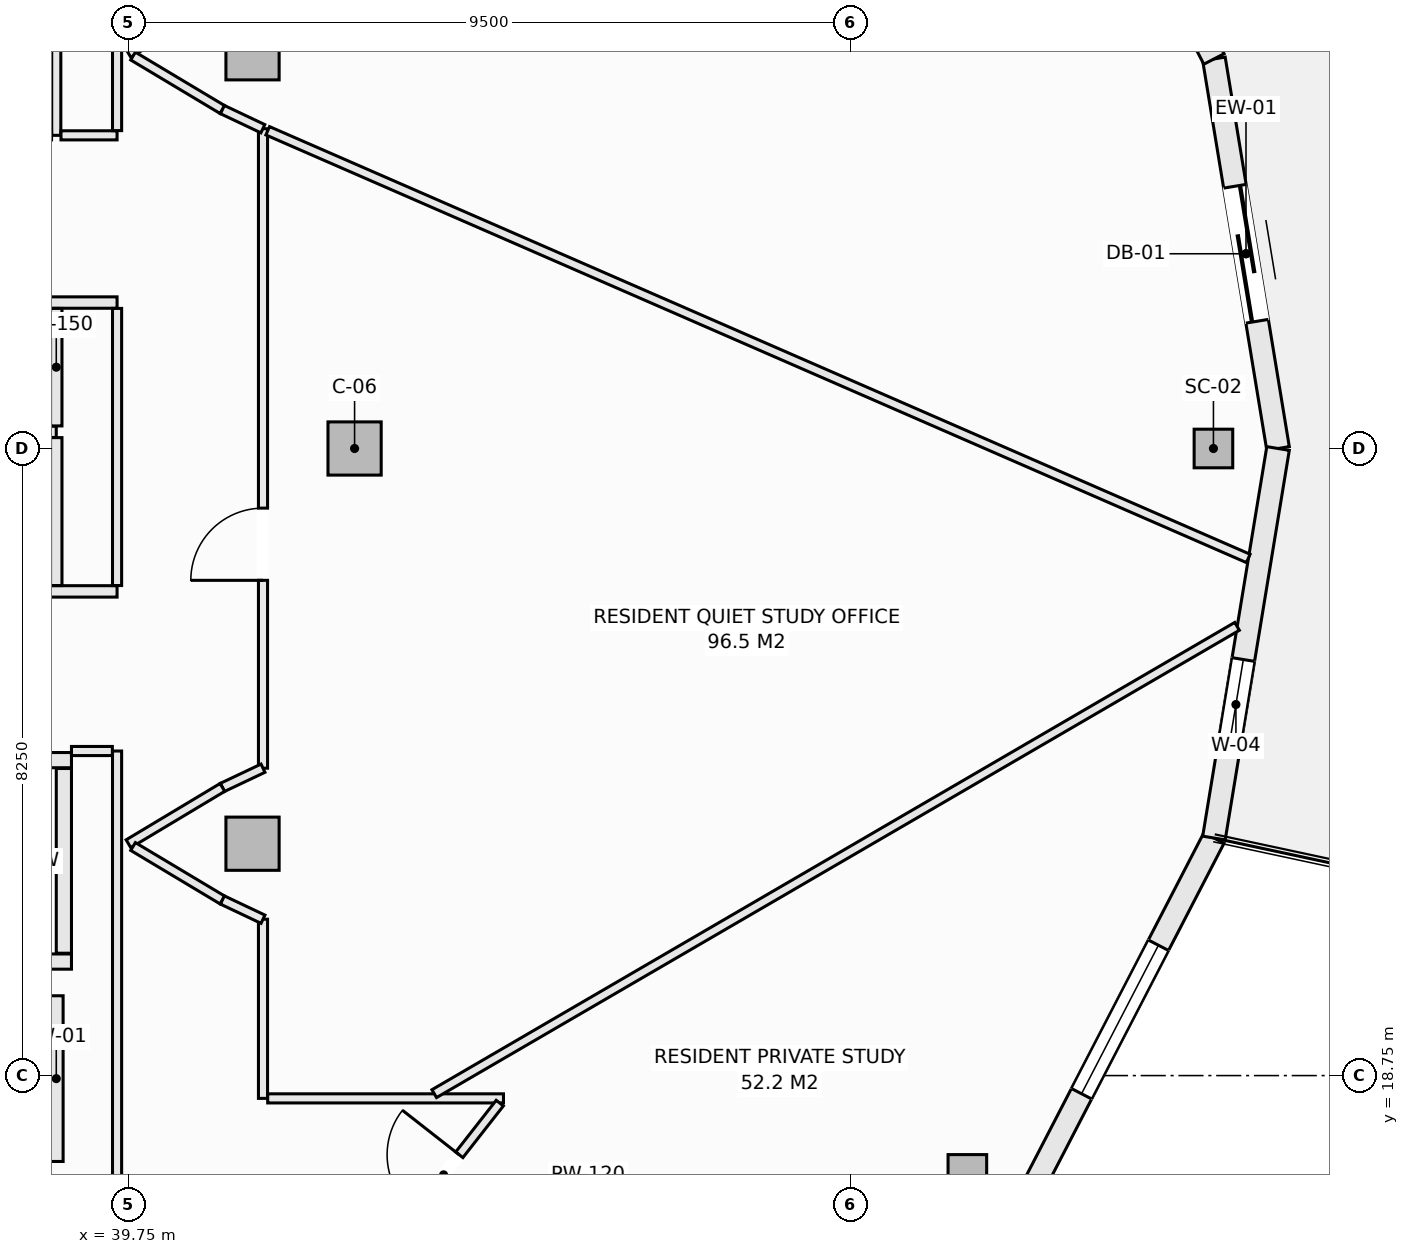
"""IFC4 building model, lengths in metres.
Left out: names, types, materials, properties, quantities, classifications, styles, units other than length and angle.
Written with IfcOpenShell. Run it as: python <this file> out.ifc"""

import sys

from ifc_helpers import new_model, si_unit, direction, frame, frame_2d, origin, origin_2d, place, context, subcontext, project, spatial, rectangle, hollow_rectangle, extrude, element, fill, save


model = new_model("IFC4")
c1 = context("Model", 3, precision=1e-05, world=origin(), true_north=direction((0.0, 1.0)))
c2 = subcontext(c1, "Body", "Model", "MODEL_VIEW")
j1 = project(units=[si_unit("LENGTHUNIT", "METRE"), si_unit("PLANEANGLEUNIT", "RADIAN")], contexts=[c1])
p1 = place(None, origin())
s1 = spatial("IfcSite", under=j1, at=p1, CompositionType="ELEMENT")
p2 = place(p1, origin())
s2 = spatial("IfcBuilding", under=s1, at=p2, CompositionType="ELEMENT")
p3 = place(p2, frame((0.0, 0.0, 232.7)))
s3 = spatial("IfcBuildingStorey", under=s2, at=p3, CompositionType="ELEMENT", Elevation=232.7)
for number, where, z_axis, x_axis in (
    (1, (54.025, 27.0, -0.27), (0.0, 0.0, 1.0), (1.0, 0.0, 0.0)),
    (2, (50.787, 17.456, -0.27), (0.0, 0.0, 1.0), (1.0, 0.0, 0.0)),
):
    element("IfcColumn", number, at=place(p3, frame(where, z_axis=z_axis, x_axis=x_axis)), inside=s3, PredefinedType="COLUMN", context=c2, shape_type="SweptSolid", body=[
        extrude(hollow_rectangle(XDim=0.508, YDim=0.508, WallThickness=0.019, at=origin_2d()), origin(), (0.0, 0.0, 1.0), 3.3),
    ])
for number, where, z_axis, x_axis in (
    (3, (42.725, 27.0, -0.27), (0.0, 0.0, 1.0), (1.0, 0.0, 0.0)),
    (4, (41.382, 32.199, -0.27), (0.0, 0.0, 1.0), (1.0, 0.0, 0.0)),
    (5, (41.382, 21.801, -0.27), (0.0, 0.0, 1.0), (1.0, 0.0, 0.0)),
):
    element("IfcColumn", number, at=place(p3, frame(where, z_axis=z_axis, x_axis=x_axis)), inside=s3, PredefinedType="COLUMN", context=c2, shape_type="SweptSolid", body=[
        extrude(rectangle(XDim=0.7, YDim=0.7, at=origin_2d()), origin(), (0.0, 0.0, 1.0), 3.3),
    ])
p4 = place(p3, frame((54.032, 32.125, 0.0), z_axis=(0.0, 0.0, 1.0), x_axis=(0.16237087798, -0.986729799886, 0.0)))
e6 = element("IfcWall", 6, at=p4, inside=s3, PredefinedType="SOLIDWALL", context=c2, shape_type="SweptSolid", body=[
    extrude(rectangle(XDim=5.193, YDim=0.3, at=frame_2d((2.597, 0.0))), origin(), (0.0, 0.0, 1.0), 2.605),
])
p5 = place(p4, frame((1.697, 0.0, 0.0)))
e7 = element("IfcOpeningElement", 7, at=p5, cuts=e6, PredefinedType="OPENING", context=c2, shape_type="SweptSolid", body=[
    extrude(rectangle(XDim=1.8, YDim=2.25, at=frame_2d((0.9, 1.125))), frame((0.0, 0.16, 0.0), z_axis=(0.0, -1.0, 0.0), x_axis=(1.0, 0.0, 0.0)), (0.0, 0.0, 1.0), 0.32),
])
p6 = place(p3, frame((51.559, 36.9, 0.0), z_axis=(0.0, 0.0, 1.0), x_axis=(0.459808219482, -0.888018243786, 0.0)))
e8 = element("IfcWall", 8, at=p6, inside=s3, PredefinedType="SOLIDWALL", context=c2, shape_type="SweptSolid", body=[
    extrude(rectangle(XDim=5.378, YDim=0.3, at=frame_2d((2.689, 0.0))), origin(), (0.0, 0.0, 1.0), 2.605),
])
p7 = place(p6, frame((1.589, 0.0, 0.72)))
e9 = element("IfcOpeningElement", 9, at=p7, cuts=e8, PredefinedType="OPENING", context=c2, shape_type="SweptSolid", body=[
    extrude(rectangle(XDim=2.2, YDim=1.65, at=frame_2d((1.1, 0.825))), frame((0.0, 0.16, 0.0), z_axis=(0.0, -1.0, 0.0), x_axis=(1.0, 0.0, 0.0)), (0.0, 0.0, 1.0), 0.32),
])
p8 = place(p3, frame((51.559, 17.1, 0.0), z_axis=(0.0, 0.0, 1.0), x_axis=(0.459808219482, 0.888018243786, 0.0)))
e10 = element("IfcWall", 10, at=p8, inside=s3, PredefinedType="SOLIDWALL", context=c2, shape_type="SweptSolid", body=[
    extrude(rectangle(XDim=5.378, YDim=0.3, at=frame_2d((2.689, 0.0))), origin(), (0.0, 0.0, 1.0), 2.605),
])
p9 = place(p8, frame((1.589, 0.0, 0.72)))
e11 = element("IfcOpeningElement", 11, at=p9, cuts=e10, PredefinedType="OPENING", context=c2, shape_type="SweptSolid", body=[
    extrude(rectangle(XDim=2.2, YDim=1.65, at=frame_2d((1.1, 0.825))), frame((0.0, 0.16, 0.0), z_axis=(0.0, -1.0, 0.0), x_axis=(1.0, 0.0, 0.0)), (0.0, 0.0, 1.0), 0.32),
])
p10 = place(p3, frame((54.032, 21.875, 0.0), z_axis=(0.0, 0.0, 1.0), x_axis=(0.16237087798, 0.986729799886, 0.0)))
e12 = element("IfcWall", 12, at=p10, inside=s3, PredefinedType="SOLIDWALL", context=c2, shape_type="SweptSolid", body=[
    extrude(rectangle(XDim=5.193, YDim=0.3, at=frame_2d((2.597, 0.0))), origin(), (0.0, 0.0, 1.0), 2.605),
])
p11 = place(p10, frame((1.18, 0.0, 0.72)))
e13 = element("IfcOpeningElement", 13, at=p11, cuts=e12, PredefinedType="OPENING", context=c2, shape_type="SweptSolid", body=[
    extrude(rectangle(XDim=1.2, YDim=1.65, at=frame_2d((0.6, 0.825))), frame((0.0, 0.16, 0.0), z_axis=(0.0, -1.0, 0.0), x_axis=(1.0, 0.0, 0.0)), (0.0, 0.0, 1.0), 0.32),
])
p12 = place(p3, frame((36.75, 22.9, 0.0), z_axis=(0.0, 0.0, 1.0), x_axis=(1.0, 0.0, 0.0)))
e14 = element("IfcWall", 14, at=p12, inside=s3, PredefinedType="SOLIDWALL", context=c2, shape_type="SweptSolid", body=[
    extrude(rectangle(XDim=2.25, YDim=0.2, at=frame_2d((1.125, 0.0))), origin(), (0.0, 0.0, 1.0), 3.03),
])
p13 = place(p12, frame((0.575, 0.0, 0.0)))
e15 = element("IfcOpeningElement", 15, at=p13, cuts=e14, PredefinedType="OPENING", context=c2, shape_type="SweptSolid", body=[
    extrude(rectangle(XDim=1.1, YDim=2.2, at=frame_2d((0.55, 1.1))), frame((0.0, 0.11, 0.0), z_axis=(0.0, -1.0, 0.0), x_axis=(1.0, 0.0, 0.0)), (0.0, 0.0, 1.0), 0.22),
])
p14 = place(p3, frame((36.75, 20.25, 0.0), z_axis=(0.0, 0.0, 1.0), x_axis=(1.0, 0.0, 0.0)))
e16 = element("IfcWall", 16, at=p14, inside=s3, PredefinedType="SOLIDWALL", context=c2, shape_type="SweptSolid", body=[
    extrude(rectangle(XDim=2.25, YDim=0.2, at=frame_2d((1.125, 0.0))), origin(), (0.0, 0.0, 1.0), 3.03),
])
p15 = place(p3, frame((38.9, 20.36, 0.0), z_axis=(0.0, 0.0, 1.0), x_axis=(0.0, 1.0, 0.0)))
e17 = element("IfcWall", 17, at=p15, inside=s3, PredefinedType="SOLIDWALL", context=c2, shape_type="SweptSolid", body=[
    extrude(rectangle(XDim=2.43, YDim=0.2, at=frame_2d((1.215, 0.0))), origin(), (0.0, 0.0, 1.0), 3.03),
])
p16 = place(p3, frame((30.077, 28.92, 0.0), z_axis=(0.0, 0.0, 1.0), x_axis=(1.0, 0.0, 0.0)))
e18 = element("IfcWall", 18, at=p16, inside=s3, PredefinedType="PARTITIONING", context=c2, shape_type="SweptSolid", body=[
    extrude(rectangle(XDim=9.523, YDim=0.15, at=frame_2d((4.762, 0.0))), origin(), (0.0, 0.0, 1.0), 3.03),
])
p17 = place(p16, frame((1.342, 0.0, 0.0)))
e19 = element("IfcOpeningElement", 19, at=p17, cuts=e18, PredefinedType="OPENING", context=c2, shape_type="SweptSolid", body=[
    extrude(rectangle(XDim=0.95, YDim=2.1, at=frame_2d((0.475, 1.05))), frame((0.0, 0.085, 0.0), z_axis=(0.0, -1.0, 0.0), x_axis=(1.0, 0.0, 0.0)), (0.0, 0.0, 1.0), 0.17),
])
p18 = place(p16, frame((5.498, 0.0, 0.0)))
e20 = element("IfcOpeningElement", 20, at=p18, cuts=e18, PredefinedType="OPENING", context=c2, shape_type="SweptSolid", body=[
    extrude(rectangle(XDim=0.95, YDim=2.1, at=frame_2d((0.475, 1.05))), frame((0.0, 0.085, 0.0), z_axis=(0.0, -1.0, 0.0), x_axis=(1.0, 0.0, 0.0)), (0.0, 0.0, 1.0), 0.17),
])
p19 = place(p3, frame((33.377, 25.12, 0.0), z_axis=(0.0, 0.0, 1.0), x_axis=(1.0, 0.0, 0.0)))
e21 = element("IfcWall", 21, at=p19, inside=s3, PredefinedType="PARTITIONING", context=c2, shape_type="SweptSolid", body=[
    extrude(rectangle(XDim=6.223, YDim=0.15, at=frame_2d((3.112, 0.0))), origin(), (0.0, 0.0, 1.0), 3.03),
])
p20 = place(p19, frame((2.441, 0.0, 0.0)))
e22 = element("IfcOpeningElement", 22, at=p20, cuts=e21, PredefinedType="OPENING", context=c2, shape_type="SweptSolid", body=[
    extrude(rectangle(XDim=0.95, YDim=2.1, at=frame_2d((0.475, 1.05))), frame((0.0, 0.085, 0.0), z_axis=(0.0, -1.0, 0.0), x_axis=(1.0, 0.0, 0.0)), (0.0, 0.0, 1.0), 0.17),
])
p21 = place(p3, frame((33.377, 27.22, 0.0), z_axis=(0.0, 0.0, 1.0), x_axis=(1.0, 0.0, 0.0)))
e23 = element("IfcWall", 23, at=p21, inside=s3, PredefinedType="PARTITIONING", context=c2, shape_type="SweptSolid", body=[
    extrude(rectangle(XDim=5.423, YDim=0.15, at=frame_2d((2.711, 0.0))), origin(), (0.0, 0.0, 1.0), 3.03),
])
p22 = place(p3, frame((38.8, 17.62, 0.0), z_axis=(0.0, 0.0, 1.0), x_axis=(0.0, 1.0, 0.0)))
e24 = element("IfcWall", 24, at=p22, inside=s3, PredefinedType="SOLIDWALL", context=c2, shape_type="SweptSolid", body=[
    extrude(rectangle(XDim=2.18, YDim=0.18, at=frame_2d((1.09, 0.0))), origin(), (0.0, 0.0, 1.0), 3.03),
])
p23 = place(p3, frame((38.8, 25.197, 0.0), z_axis=(0.0, 0.0, 1.0), x_axis=(0.0, 1.0, 0.0)))
e25 = element("IfcWall", 25, at=p23, inside=s3, PredefinedType="PARTITIONING", context=c2, shape_type="SweptSolid", body=[
    extrude(rectangle(XDim=1.946, YDim=0.15, at=frame_2d((0.973, 0.0))), origin(), (0.0, 0.0, 1.0), 3.03),
])
p24 = place(p3, frame((38.8, 27.297, 0.0), z_axis=(0.0, 0.0, 1.0), x_axis=(0.0, 1.0, 0.0)))
e26 = element("IfcWall", 26, at=p24, inside=s3, PredefinedType="PARTITIONING", context=c2, shape_type="SweptSolid", body=[
    extrude(rectangle(XDim=1.546, YDim=0.15, at=frame_2d((0.773, 0.0))), origin(), (0.0, 0.0, 1.0), 3.03),
])
p25 = place(p3, frame((38.8, 31.12, 0.0), z_axis=(0.0, 0.0, 1.0), x_axis=(0.0, 1.0, 0.0)))
e27 = element("IfcWall", 27, at=p25, inside=s3, PredefinedType="PARTITIONING", context=c2, shape_type="SweptSolid", body=[
    extrude(rectangle(XDim=2.63, YDim=0.12, at=frame_2d((1.315, 0.0))), origin(), (0.0, 0.0, 1.0), 3.03),
])
p26 = place(p3, frame((38.862, 31.12, 0.0), z_axis=(0.0, 0.0, 1.0), x_axis=(1.0, 0.0, 0.0)))
e28 = element("IfcWall", 28, at=p26, inside=s3, PredefinedType="PARTITIONING", context=c2, shape_type="SweptSolid", body=[
    extrude(rectangle(XDim=0.738, YDim=0.12, at=frame_2d((0.369, 0.0))), origin(), (0.0, 0.0, 1.0), 3.03),
])
p27 = place(p3, frame((39.6, 16.5, 0.0), z_axis=(0.0, 0.0, 1.0), x_axis=(0.0, 1.0, 0.0)))
e29 = element("IfcWall", 29, at=p27, inside=s3, PredefinedType="PARTITIONING", context=c2, shape_type="SweptSolid", body=[
    extrude(rectangle(XDim=6.52, YDim=0.12, at=frame_2d((3.26, 0.0))), origin(), (0.0, 0.0, 1.0), 2.478),
])
p28 = place(p3, frame((39.6, 25.197, 0.0), z_axis=(0.0, 0.0, 1.0), x_axis=(0.0, 1.0, 0.0)))
e30 = element("IfcWall", 30, at=p28, inside=s3, PredefinedType="PARTITIONING", context=c2, shape_type="SweptSolid", body=[
    extrude(rectangle(XDim=3.646, YDim=0.12, at=frame_2d((1.823, 0.0))), origin(), (0.0, 0.0, 1.0), 3.03),
])
p29 = place(p3, frame((39.6, 31.182, 0.0), z_axis=(0.0, 0.0, 1.0), x_axis=(0.0, 1.0, 0.0)))
e31 = element("IfcWall", 31, at=p29, inside=s3, PredefinedType="PARTITIONING", context=c2, shape_type="SweptSolid", body=[
    extrude(rectangle(XDim=6.318, YDim=0.12, at=frame_2d((3.159, 0.0))), origin(), (0.0, 0.0, 1.0), 3.03),
])
p30 = place(p3, frame((41.52, 18.45, 0.0), z_axis=(0.0, 0.0, 1.0), x_axis=(0.0, 1.0, 0.0)))
e32 = element("IfcWall", 32, at=p30, inside=s3, PredefinedType="PARTITIONING", context=c2, shape_type="SweptSolid", body=[
    extrude(rectangle(XDim=2.357, YDim=0.12, at=frame_2d((1.178, 0.0))), origin(), (0.0, 0.0, 1.0), 3.03),
])
p31 = place(p3, frame((41.52, 22.794, 0.0), z_axis=(0.0, 0.0, 1.0), x_axis=(0.0, 1.0, 0.0)))
e33 = element("IfcWall", 33, at=p31, inside=s3, PredefinedType="PARTITIONING", context=c2, shape_type="SweptSolid", body=[
    extrude(rectangle(XDim=8.413, YDim=0.12, at=frame_2d((4.207, 0.0))), origin(), (0.0, 0.0, 1.0), 2.478),
])
p32 = place(p31, frame((2.471, 0.0, 0.0)))
e34 = element("IfcOpeningElement", 34, at=p32, cuts=e33, PredefinedType="OPENING", context=c2, shape_type="SweptSolid", body=[
    extrude(rectangle(XDim=0.95, YDim=2.1, at=frame_2d((0.475, 1.05))), frame((0.0, 0.07, 0.0), z_axis=(0.0, -1.0, 0.0), x_axis=(1.0, 0.0, 0.0)), (0.0, 0.0, 1.0), 0.14),
])
p33 = place(p3, frame((39.75, 32.199, 0.0), z_axis=(0.0, 0.0, 1.0), x_axis=(0.857702120906, 0.514146935996, 0.0)))
e35 = element("IfcWall", 35, at=p33, inside=s3, PredefinedType="PARTITIONING", context=c2, shape_type="SweptSolid", body=[
    extrude(rectangle(XDim=1.441, YDim=0.12, at=frame_2d((0.721, 0.0))), origin(), (0.0, 0.0, 1.0), 3.03),
])
p34 = place(p3, frame((39.81, 32.163, 0.0), z_axis=(0.0, 0.0, 1.0), x_axis=(0.858011245414, -0.513630901273, 0.0)))
e36 = element("IfcWall", 36, at=p34, inside=s3, PredefinedType="PARTITIONING", context=c2, shape_type="SweptSolid", body=[
    extrude(rectangle(XDim=1.37, YDim=0.12, at=frame_2d((0.685, 0.0))), origin(), (0.0, 0.0, 1.0), 3.03),
])
p35 = place(p3, frame((40.986, 31.459, 0.0), z_axis=(0.0, 0.0, 1.0), x_axis=(0.903687141457, -0.428193356283, 0.0)))
e37 = element("IfcWall", 37, at=p35, inside=s3, PredefinedType="PARTITIONING", context=c2, shape_type="SweptSolid", body=[
    extrude(rectangle(XDim=0.588, YDim=0.12, at=frame_2d((0.294, 0.0))), origin(), (0.0, 0.0, 1.0), 3.03),
])
p36 = place(p3, frame((40.986, 22.541, 0.0), z_axis=(0.0, 0.0, 1.0), x_axis=(0.903729424576, 0.428104107847, 0.0)))
e38 = element("IfcWall", 38, at=p36, inside=s3, PredefinedType="PARTITIONING", context=c2, shape_type="SweptSolid", body=[
    extrude(rectangle(XDim=0.591, YDim=0.12, at=frame_2d((0.295, 0.0))), origin(), (0.0, 0.0, 1.0), 3.03),
])
p37 = place(p3, frame((39.75, 21.8, 0.0), z_axis=(0.0, 0.0, 1.0), x_axis=(0.857702120906, 0.514146935996, 0.0)))
e39 = element("IfcWall", 39, at=p37, inside=s3, PredefinedType="PARTITIONING", context=c2, shape_type="SweptSolid", body=[
    extrude(rectangle(XDim=1.441, YDim=0.12, at=frame_2d((0.721, 0.0))), origin(), (0.0, 0.0, 1.0), 3.03),
])
p38 = place(p3, frame((39.81, 21.764, 0.0), z_axis=(0.0, 0.0, 1.0), x_axis=(0.858011245414, -0.513630901273, 0.0)))
e40 = element("IfcWall", 40, at=p38, inside=s3, PredefinedType="PARTITIONING", context=c2, shape_type="SweptSolid", body=[
    extrude(rectangle(XDim=1.37, YDim=0.12, at=frame_2d((0.685, 0.0))), origin(), (0.0, 0.0, 1.0), 3.03),
])
p39 = place(p3, frame((40.986, 21.06, 0.0), z_axis=(0.0, 0.0, 1.0), x_axis=(0.90356951601, -0.428441512621, 0.0)))
e41 = element("IfcWall", 41, at=p39, inside=s3, PredefinedType="PARTITIONING", context=c2, shape_type="SweptSolid", body=[
    extrude(rectangle(XDim=0.591, YDim=0.12, at=frame_2d((0.295, 0.0))), origin(), (0.0, 0.0, 1.0), 3.03),
])
p40 = place(p3, frame((41.582, 18.45, 0.0), z_axis=(0.0, 0.0, 1.0), x_axis=(1.0, 0.0, 0.0)))
e42 = element("IfcWall", 42, at=p40, inside=s3, PredefinedType="PARTITIONING", context=c2, shape_type="SweptSolid", body=[
    extrude(rectangle(XDim=3.102, YDim=0.12, at=frame_2d((1.551, 0.0))), origin(), (0.0, 0.0, 1.0), 3.03),
])
p41 = place(p3, frame((43.157, 16.5, 0.0), z_axis=(0.0, 0.0, 1.0), x_axis=(0.616566276607, 0.787303008092, 0.0)))
e43 = element("IfcWall", 43, at=p41, inside=s3, PredefinedType="PARTITIONING", context=c2, shape_type="SweptSolid", body=[
    extrude(rectangle(XDim=2.398, YDim=0.12, at=frame_2d((1.199, 0.0))), origin(), (0.0, 0.0, 1.0), 3.03),
])
p42 = place(p41, frame((0.584, 0.0, 0.0)))
e44 = element("IfcOpeningElement", 44, at=p42, cuts=e43, PredefinedType="OPENING", context=c2, shape_type="SweptSolid", body=[
    extrude(rectangle(XDim=0.95, YDim=2.1, at=frame_2d((0.475, 1.05))), frame((0.0, 0.07, 0.0), z_axis=(0.0, -1.0, 0.0), x_axis=(1.0, 0.0, 0.0)), (0.0, 0.0, 1.0), 0.14),
])
p43 = place(p3, frame((39.0, 23.02, 0.0), z_axis=(0.0, 0.0, 1.0), x_axis=(1.0, 0.0, 0.0)))
e45 = element("IfcWall", 45, at=p43, inside=s3, PredefinedType="PARTITIONING", context=c2, shape_type="SweptSolid", body=[
    extrude(rectangle(XDim=0.538, YDim=0.12, at=frame_2d((0.269, 0.0))), origin(), (0.0, 0.0, 1.0), 3.03),
])
p44 = place(p3, frame((43.773, 18.512, 0.0), z_axis=(0.0, 0.0, 1.0), x_axis=(0.864261022419, 0.503043621495, 0.0)))
e46 = element("IfcWall", 46, at=p44, inside=s3, PredefinedType="PARTITIONING", context=c2, shape_type="SweptSolid", body=[
    extrude(rectangle(XDim=12.222, YDim=0.12, at=frame_2d((6.111, 0.0))), origin(), (0.0, 0.0, 1.0), 3.03),
])
p45 = place(p3, frame((41.582, 31.18, 0.0), z_axis=(0.0, 0.0, 1.0), x_axis=(0.916624100851, -0.399750244202, 0.0)))
e47 = element("IfcWall", 47, at=p45, inside=s3, PredefinedType="PARTITIONING", context=c2, shape_type="SweptSolid", body=[
    extrude(rectangle(XDim=14.074, YDim=0.12, at=frame_2d((7.037, 0.0))), origin(), (0.0, 0.0, 1.0), 2.478),
])
p46 = place(p5, origin())
e48 = element("IfcDoor", 48, at=p46, inside=s3, OperationType="SLIDING_TO_LEFT", PredefinedType="DOOR", context=c2, shape_type="SweptSolid", body=[
    extrude(rectangle(XDim=1.8, YDim=2.25, at=frame_2d((0.9, 1.125))), frame((0.0, 0.025, 0.0), z_axis=(0.0, -1.0, 0.0), x_axis=(1.0, 0.0, 0.0)), (0.0, 0.0, 1.0), 0.05),
])
fill(e7, e48)
p47 = place(p9, origin())
e49 = element("IfcWindow", 49, at=p47, inside=s3, PartitioningType="SINGLE_PANEL", PredefinedType="WINDOW", context=c2, shape_type="SweptSolid", body=[
    extrude(rectangle(XDim=2.2, YDim=1.65, at=frame_2d((1.1, 0.825))), frame((0.0, 0.03, 0.0), z_axis=(0.0, -1.0, 0.0), x_axis=(1.0, 0.0, 0.0)), (0.0, 0.0, 1.0), 0.06),
])
fill(e11, e49)
p48 = place(p11, origin())
e50 = element("IfcWindow", 50, at=p48, inside=s3, PartitioningType="SINGLE_PANEL", PredefinedType="WINDOW", context=c2, shape_type="SweptSolid", body=[
    extrude(rectangle(XDim=1.2, YDim=1.65, at=frame_2d((0.6, 0.825))), frame((0.0, 0.03, 0.0), z_axis=(0.0, -1.0, 0.0), x_axis=(1.0, 0.0, 0.0)), (0.0, 0.0, 1.0), 0.06),
])
fill(e13, e50)
p49 = place(p42, origin())
e51 = element("IfcDoor", 51, at=p49, inside=s3, OperationType="SINGLE_SWING_RIGHT", PredefinedType="DOOR", context=c2, shape_type="SweptSolid", body=[
    extrude(rectangle(XDim=0.95, YDim=2.1, at=frame_2d((0.475, 1.05))), frame((0.0, 0.025, 0.0), z_axis=(0.0, -1.0, 0.0), x_axis=(1.0, 0.0, 0.0)), (0.0, 0.0, 1.0), 0.05),
])
fill(e44, e51)
p50 = place(p32, origin())
e52 = element("IfcDoor", 52, at=p50, inside=s3, OperationType="SINGLE_SWING_LEFT", PredefinedType="DOOR", context=c2, shape_type="SweptSolid", body=[
    extrude(rectangle(XDim=0.95, YDim=2.1, at=frame_2d((0.475, 1.05))), frame((0.0, 0.025, 0.0), z_axis=(0.0, -1.0, 0.0), x_axis=(1.0, 0.0, 0.0)), (0.0, 0.0, 1.0), 0.05),
])
fill(e34, e52)
save(model, sys.argv[1])
